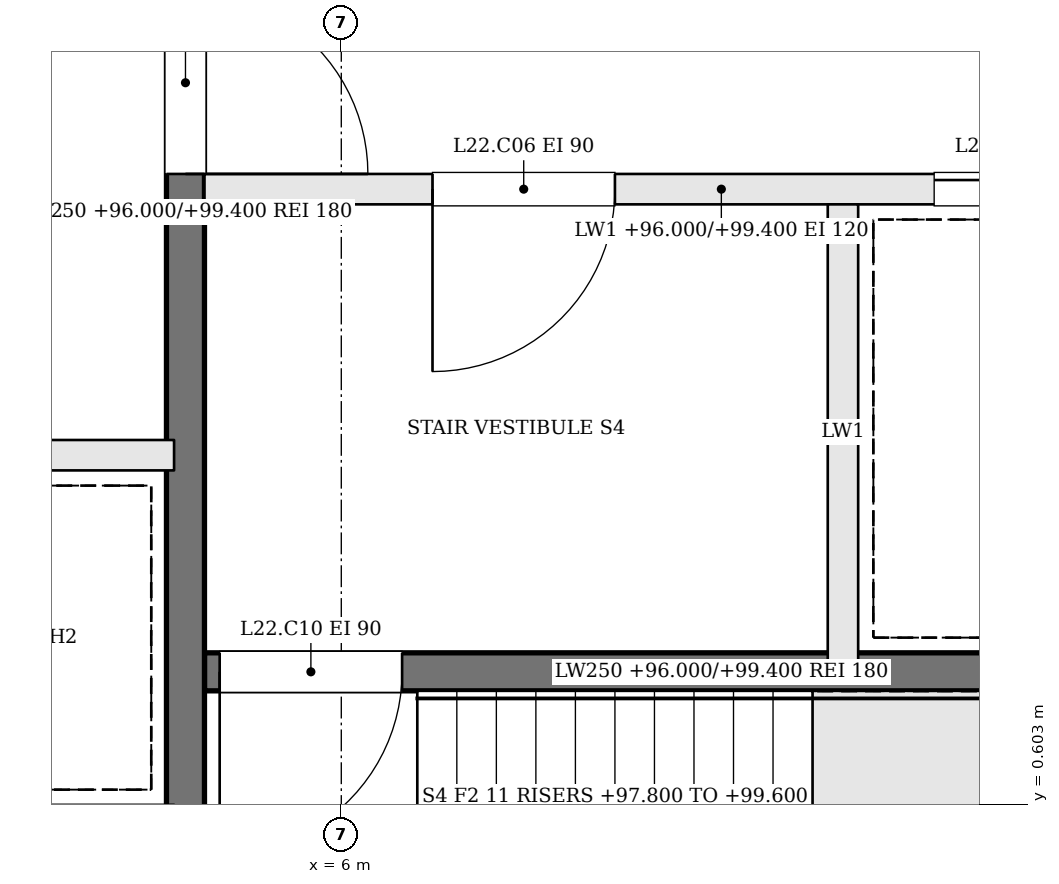
"""IFC4 building model, lengths in metres.
Left out: names, types, materials, properties, quantities, classifications, styles, units other than length and angle.
Written with IfcOpenShell. Run it as: python <this file> out.ifc"""

import sys

from ifc_helpers import new_model, si_unit, direction, frame, frame_2d, origin, place, context, subcontext, project, spatial, rectangle, extrude, element, fill, save


model = new_model("IFC4")
c1 = context("Model", 3, precision=1e-05, world=origin(), true_north=direction((0.0, 1.0)))
c2 = subcontext(c1, "Body", "Model", "MODEL_VIEW")
j1 = project(units=[si_unit("LENGTHUNIT", "METRE"), si_unit("PLANEANGLEUNIT", "RADIAN")], contexts=[c1])
p1 = place(None, origin())
s1 = spatial("IfcSite", under=j1, at=p1, CompositionType="ELEMENT")
p2 = place(p1, origin())
s2 = spatial("IfcBuilding", under=s1, at=p2, CompositionType="ELEMENT")
p3 = place(p2, frame((0.0, 0.0, 96.0)))
s3 = spatial("IfcBuildingStorey", under=s2, at=p3, CompositionType="ELEMENT", Elevation=96.0)
p4 = place(p3, frame((11.9, 4.65, 0.0), z_axis=(0.0, 0.0, 1.0), x_axis=(-1.0, 0.0, 0.0)))
e1 = element("IfcWall", 1, at=p4, inside=s3, PredefinedType="SOLIDWALL", context=c2, shape_type="SweptSolid", body=[
    extrude(rectangle(XDim=6.8, YDim=0.2, at=frame_2d((3.4, 0.0))), origin(), (0.0, 0.0, 1.0), 3.4),
])
p5 = place(p4, frame((4.1, 0.0, 0.0)))
e2 = element("IfcOpeningElement", 2, at=p5, cuts=e1, PredefinedType="OPENING", context=c2, shape_type="SweptSolid", body=[
    extrude(rectangle(XDim=1.2, YDim=2.1, at=frame_2d((0.6, 1.05))), frame((0.0, 0.11, 0.0), z_axis=(0.0, -1.0, 0.0), x_axis=(1.0, 0.0, 0.0)), (0.0, 0.0, 1.0), 0.22),
])
p6 = place(p4, frame((0.8, 0.0, 0.0)))
e3 = element("IfcOpeningElement", 3, at=p6, cuts=e1, PredefinedType="OPENING", context=c2, shape_type="SweptSolid", body=[
    extrude(rectangle(XDim=1.2, YDim=2.1, at=frame_2d((0.6, 1.05))), frame((0.0, 0.11, 0.0), z_axis=(0.0, -1.0, 0.0), x_axis=(1.0, 0.0, 0.0)), (0.0, 0.0, 1.0), 0.22),
])
p7 = place(p3, frame((11.9, 1.475, 0.0), z_axis=(0.0, 0.0, 1.0), x_axis=(-1.0, 0.0, 0.0)))
e4 = element("IfcWall", 4, at=p7, inside=s3, PredefinedType="SOLIDWALL", context=c2, shape_type="SweptSolid", body=[
    extrude(rectangle(XDim=6.8, YDim=0.25, at=frame_2d((3.4, 0.0))), origin(), (0.0, 0.0, 1.0), 3.4),
])
p8 = place(p7, frame((5.5, 0.0, 0.0)))
e5 = element("IfcOpeningElement", 5, at=p8, cuts=e4, PredefinedType="OPENING", context=c2, shape_type="SweptSolid", body=[
    extrude(rectangle(XDim=1.2, YDim=2.1, at=frame_2d((0.6, 1.05))), frame((0.0, 0.135, 0.0), z_axis=(0.0, -1.0, 0.0), x_axis=(1.0, 0.0, 0.0)), (0.0, 0.0, 1.0), 0.27),
])
p9 = place(p3, frame((9.3, 4.55, 0.0), z_axis=(0.0, 0.0, 1.0), x_axis=(0.0, -1.0, 0.0)))
e6 = element("IfcWall", 6, at=p9, inside=s3, PredefinedType="SOLIDWALL", context=c2, shape_type="SweptSolid", body=[
    extrude(rectangle(XDim=3.0, YDim=0.2, at=frame_2d((1.5, 0.0))), origin(), (0.0, 0.0, 1.0), 3.4),
])
p10 = place(p3, frame((4.975, 10.9, 0.0), z_axis=(0.0, 0.0, 1.0), x_axis=(0.0, -1.0, 0.0)))
e7 = element("IfcWall", 7, at=p10, inside=s3, PredefinedType="SOLIDWALL", context=c2, shape_type="SweptSolid", body=[
    extrude(rectangle(XDim=12.8, YDim=0.25, at=frame_2d((6.4, 0.0))), origin(), (0.0, 0.0, 1.0), 3.4),
])
p11 = place(p10, frame((4.95, 0.0, 0.0)))
e8 = element("IfcOpeningElement", 8, at=p11, cuts=e7, PredefinedType="OPENING", context=c2, shape_type="SweptSolid", body=[
    extrude(rectangle(XDim=1.2, YDim=2.1, at=frame_2d((0.6, 1.05))), frame((0.0, 0.135, 0.0), z_axis=(0.0, -1.0, 0.0), x_axis=(1.0, 0.0, 0.0)), (0.0, 0.0, 1.0), 0.27),
])
p12 = place(p3, frame((-4.9, 2.9, 0.0), z_axis=(0.0, 0.0, 1.0), x_axis=(1.0, 0.0, 0.0)))
e9 = element("IfcWall", 9, at=p12, inside=s3, PredefinedType="SOLIDWALL", context=c2, shape_type="SweptSolid", body=[
    extrude(rectangle(XDim=9.8, YDim=0.2, at=frame_2d((4.9, 0.0))), origin(), (0.0, 0.0, 1.0), 3.4),
])
p13 = place(p12, frame((0.675, 0.0, 0.0)))
e10 = element("IfcOpeningElement", 10, at=p13, cuts=e9, PredefinedType="OPENING", context=c2, shape_type="SweptSolid", body=[
    extrude(rectangle(XDim=1.1, YDim=2.1, at=frame_2d((0.55, 1.05))), frame((0.0, 0.11, 0.0), z_axis=(0.0, -1.0, 0.0), x_axis=(1.0, 0.0, 0.0)), (0.0, 0.0, 1.0), 0.22),
])
p14 = place(p12, frame((3.125, 0.0, 0.0)))
e11 = element("IfcOpeningElement", 11, at=p14, cuts=e9, PredefinedType="OPENING", context=c2, shape_type="SweptSolid", body=[
    extrude(rectangle(XDim=1.1, YDim=2.1, at=frame_2d((0.55, 1.05))), frame((0.0, 0.11, 0.0), z_axis=(0.0, -1.0, 0.0), x_axis=(1.0, 0.0, 0.0)), (0.0, 0.0, 1.0), 0.22),
])
p15 = place(p11, origin())
e12 = element("IfcDoor", 12, at=p15, inside=s3, OperationType="SINGLE_SWING_RIGHT", PredefinedType="DOOR", context=c2, shape_type="SweptSolid", body=[
    extrude(rectangle(XDim=1.2, YDim=2.1, at=frame_2d((0.6, 1.05))), frame((0.0, 0.025, 0.0), z_axis=(0.0, -1.0, 0.0), x_axis=(1.0, 0.0, 0.0)), (0.0, 0.0, 1.0), 0.05),
])
fill(e8, e12)
p16 = place(p5, origin())
e13 = element("IfcDoor", 13, at=p16, inside=s3, OperationType="SINGLE_SWING_RIGHT", PredefinedType="DOOR", context=c2, shape_type="SweptSolid", body=[
    extrude(rectangle(XDim=1.2, YDim=2.1, at=frame_2d((0.6, 1.05))), frame((0.0, 0.025, 0.0), z_axis=(0.0, -1.0, 0.0), x_axis=(1.0, 0.0, 0.0)), (0.0, 0.0, 1.0), 0.05),
])
fill(e2, e13)
p17 = place(p8, origin())
e14 = element("IfcDoor", 14, at=p17, inside=s3, OperationType="SINGLE_SWING_RIGHT", PredefinedType="DOOR", context=c2, shape_type="SweptSolid", body=[
    extrude(rectangle(XDim=1.2, YDim=2.1, at=frame_2d((0.6, 1.05))), frame((0.0, 0.025, 0.0), z_axis=(0.0, -1.0, 0.0), x_axis=(1.0, 0.0, 0.0)), (0.0, 0.0, 1.0), 0.05),
])
fill(e5, e14)
p18 = place(p6, origin())
e15 = element("IfcDoor", 15, at=p18, inside=s3, OperationType="SLIDING_TO_RIGHT", PredefinedType="DOOR", context=c2, shape_type="SweptSolid", body=[
    extrude(rectangle(XDim=1.2, YDim=2.1, at=frame_2d((0.6, 1.05))), frame((0.0, 0.025, 0.0), z_axis=(0.0, -1.0, 0.0), x_axis=(1.0, 0.0, 0.0)), (0.0, 0.0, 1.0), 0.05),
])
fill(e3, e15)
save(model, sys.argv[1])
